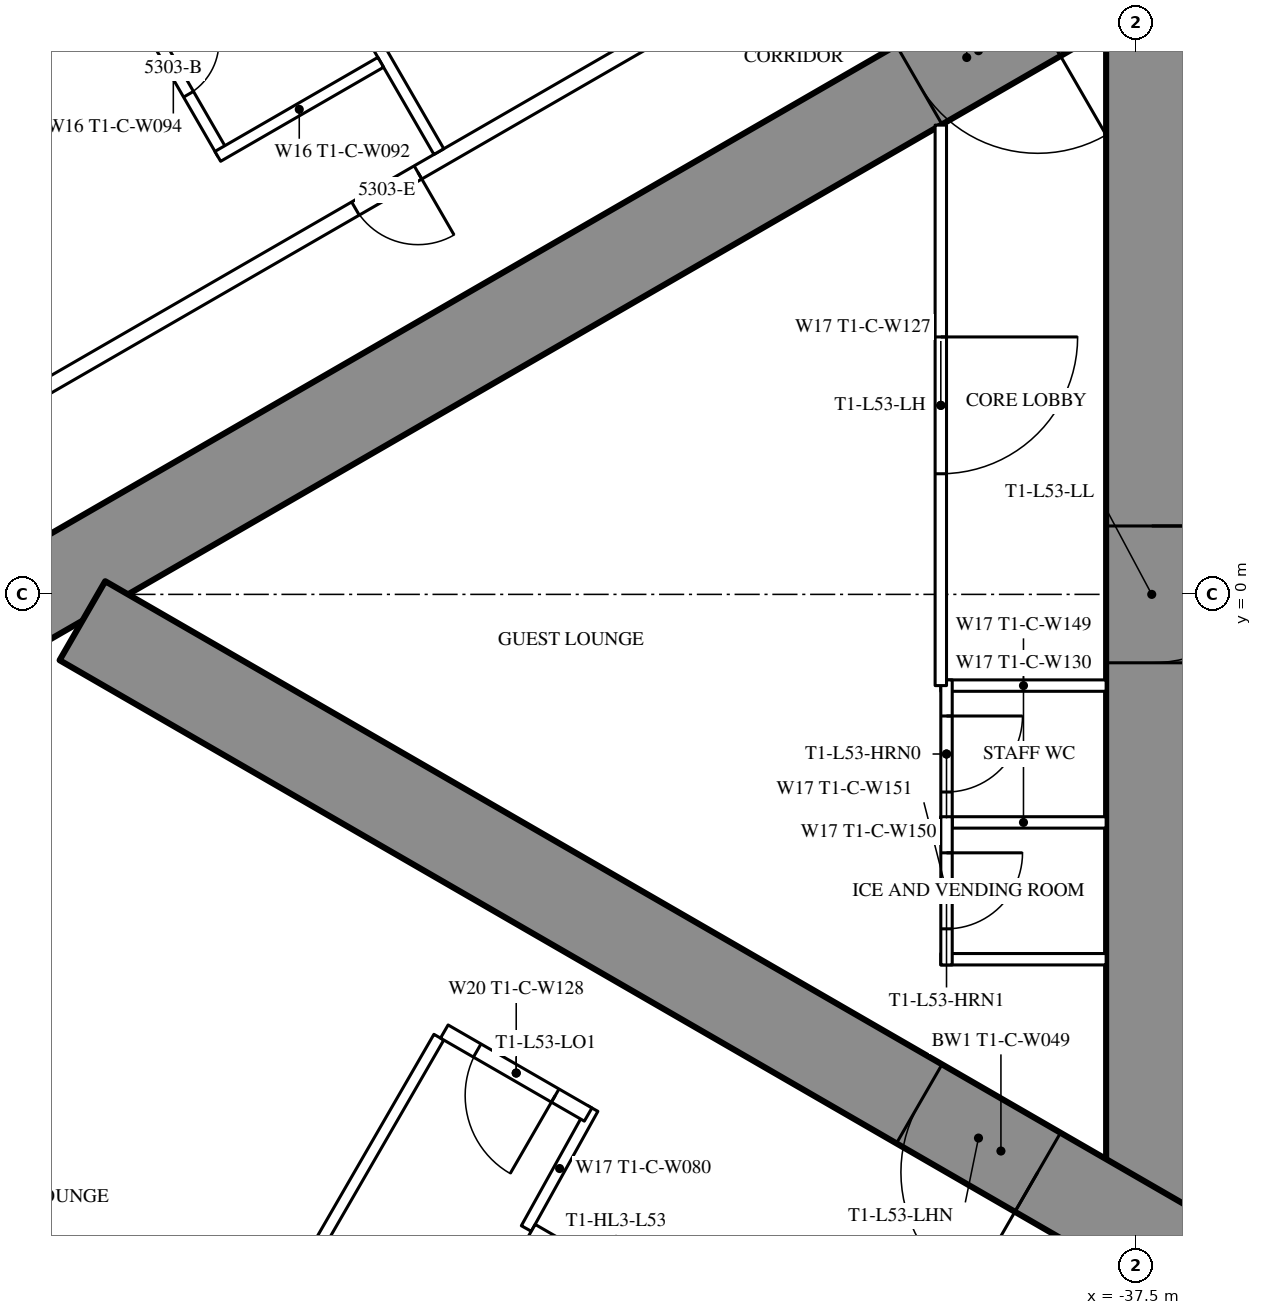
"""IFC4 building model, lengths in metres.
Left out: names, types, materials, properties, quantities, classifications, styles, units other than length and angle.
Written with IfcOpenShell. Run it as: python <this file> out.ifc"""

import sys

from ifc_helpers import new_model, si_unit, direction, frame, frame_2d, origin, place, context, subcontext, project, spatial, rectangle, extrude, element, fill, save


model = new_model("IFC4")
c1 = context("Model", 3, precision=1e-05, world=origin(), true_north=direction((0.0, 1.0)))
c2 = subcontext(c1, "Body", "Model", "MODEL_VIEW")
j1 = project(units=[si_unit("LENGTHUNIT", "METRE"), si_unit("PLANEANGLEUNIT", "RADIAN")], contexts=[c1])
p1 = place(None, origin())
s1 = spatial("IfcSite", under=j1, at=p1, CompositionType="ELEMENT")
p2 = place(p1, origin())
s2 = spatial("IfcBuilding", under=s1, at=p2, CompositionType="ELEMENT")
p3 = place(p2, frame((0.0, 0.0, 198.3)))
s3 = spatial("IfcBuildingStorey", under=s2, at=p3, CompositionType="ELEMENT", Elevation=198.3)
p4 = place(p3, frame((-37.3, 8.6, 0.0), z_axis=(0.0, 0.0, 1.0), x_axis=(0.0, -1.0, 0.0)))
e1 = element("IfcWall", 1, at=p4, inside=s3, PredefinedType="SHEAR", context=c2, shape_type="SweptSolid", body=[
    extrude(rectangle(XDim=17.2, YDim=1.2, at=frame_2d((8.6, 0.0))), origin(), (0.0, 0.0, 1.0), 3.5),
])
p5 = place(p4, frame((7.7, 0.0, 0.0)))
e2 = element("IfcOpeningElement", 2, at=p5, cuts=e1, PredefinedType="OPENING", context=c2, shape_type="SweptSolid", body=[
    extrude(rectangle(XDim=1.8, YDim=2.2, at=frame_2d((0.9, 1.1))), frame((0.0, 0.61, 0.0), z_axis=(0.0, -1.0, 0.0), x_axis=(1.0, 0.0, 0.0)), (0.0, 0.0, 1.0), 1.22),
])
p6 = place(p3, frame((-27.2, 14.3, 0.0), z_axis=(0.0, 0.0, 1.0), x_axis=(-0.866026593062, -0.499997940104, 0.0)))
e3 = element("IfcWall", 3, at=p6, inside=s3, PredefinedType="SHEAR", context=c2, shape_type="SweptSolid", body=[
    extrude(rectangle(XDim=28.946, YDim=1.2, at=frame_2d((14.473, 0.0))), origin(), (0.0, 0.0, 1.0), 3.5),
])
p7 = place(p6, frame((4.6, 0.0, 0.0)))
e4 = element("IfcOpeningElement", 4, at=p7, cuts=e3, PredefinedType="OPENING", context=c2, shape_type="SweptSolid", body=[
    extrude(rectangle(XDim=1.0, YDim=2.2, at=frame_2d((0.5, 1.1))), frame((0.0, 0.61, 0.0), z_axis=(0.0, -1.0, 0.0), x_axis=(1.0, 0.0, 0.0)), (0.0, 0.0, 1.0), 1.22),
])
p8 = place(p6, frame((13.395, 0.0, 0.0)))
e5 = element("IfcOpeningElement", 5, at=p8, cuts=e3, PredefinedType="OPENING", context=c2, shape_type="SweptSolid", body=[
    extrude(rectangle(XDim=1.8, YDim=2.2, at=frame_2d((0.9, 1.1))), frame((0.0, 0.61, 0.0), z_axis=(0.0, -1.0, 0.0), x_axis=(1.0, 0.0, 0.0)), (0.0, 0.0, 1.0), 1.22),
])
p9 = place(p3, frame((-27.2, -14.3, 0.0), z_axis=(0.0, 0.0, 1.0), x_axis=(-0.866024021859, 0.500002393557, 0.0)))
e6 = element("IfcWall", 6, at=p9, inside=s3, PredefinedType="SHEAR", context=c2, shape_type="SweptSolid", body=[
    extrude(rectangle(XDim=27.907, YDim=1.2, at=frame_2d((13.954, 0.0))), origin(), (0.0, 0.0, 1.0), 3.5),
])
p10 = place(p9, frame((4.6, 0.0, 0.0)))
e7 = element("IfcOpeningElement", 7, at=p10, cuts=e6, PredefinedType="OPENING", context=c2, shape_type="SweptSolid", body=[
    extrude(rectangle(XDim=1.0, YDim=2.2, at=frame_2d((0.5, 1.1))), frame((0.0, 0.61, 0.0), z_axis=(0.0, -1.0, 0.0), x_axis=(1.0, 0.0, 0.0)), (0.0, 0.0, 1.0), 1.22),
])
p11 = place(p9, frame((13.395, 0.0, 0.0)))
e8 = element("IfcOpeningElement", 8, at=p11, cuts=e6, PredefinedType="OPENING", context=c2, shape_type="SweptSolid", body=[
    extrude(rectangle(XDim=1.8, YDim=2.2, at=frame_2d((0.9, 1.1))), frame((0.0, 0.61, 0.0), z_axis=(0.0, -1.0, 0.0), x_axis=(1.0, 0.0, 0.0)), (0.0, 0.0, 1.0), 1.22),
])
p12 = place(p3, frame((-27.86, 16.575, 0.0), z_axis=(0.0, 0.0, 1.0), x_axis=(-0.866025533911, -0.499999774615, 0.0)))
e9 = element("IfcWall", 9, at=p12, inside=s3, PredefinedType="PARTITIONING", context=c2, shape_type="SweptSolid", body=[
    extrude(rectangle(XDim=33.149, YDim=0.2, at=frame_2d((16.575, 0.0))), origin(), (0.0, 0.0, 1.0), 3.25),
])
p13 = place(p12, frame((3.75, 0.0, 0.0)))
e10 = element("IfcOpeningElement", 10, at=p13, cuts=e9, PredefinedType="OPENING", context=c2, shape_type="SweptSolid", body=[
    extrude(rectangle(XDim=1.0, YDim=2.2, at=frame_2d((0.5, 1.1))), frame((0.0, 0.11, 0.0), z_axis=(0.0, -1.0, 0.0), x_axis=(1.0, 0.0, 0.0)), (0.0, 0.0, 1.0), 0.22),
])
p14 = place(p12, frame((16.402, 0.0, 0.0)))
e11 = element("IfcOpeningElement", 11, at=p14, cuts=e9, PredefinedType="OPENING", context=c2, shape_type="SweptSolid", body=[
    extrude(rectangle(XDim=0.95, YDim=2.2, at=frame_2d((0.475, 1.1))), frame((0.0, 0.11, 0.0), z_axis=(0.0, -1.0, 0.0), x_axis=(1.0, 0.0, 0.0)), (0.0, 0.0, 1.0), 0.22),
])
p15 = place(p12, frame((22.047, 0.0, 0.0)))
e12 = element("IfcOpeningElement", 12, at=p15, cuts=e9, PredefinedType="OPENING", context=c2, shape_type="SweptSolid", body=[
    extrude(rectangle(XDim=0.95, YDim=2.2, at=frame_2d((0.475, 1.1))), frame((0.0, 0.11, 0.0), z_axis=(0.0, -1.0, 0.0), x_axis=(1.0, 0.0, 0.0)), (0.0, 0.0, 1.0), 0.22),
])
p16 = place(p12, frame((30.396, 0.0, 0.0)))
e13 = element("IfcOpeningElement", 13, at=p16, cuts=e9, PredefinedType="OPENING", context=c2, shape_type="SweptSolid", body=[
    extrude(rectangle(XDim=1.8, YDim=2.2, at=frame_2d((0.9, 1.1))), frame((0.0, 0.11, 0.0), z_axis=(0.0, -1.0, 0.0), x_axis=(1.0, 0.0, 0.0)), (0.0, 0.0, 1.0), 0.22),
])
for number, where, z_axis, x_axis in (
    (14, (-46.679, 5.825, 0.0), (0.0, 0.0, 1.0), (-0.5, 0.866, 0.0)),
    (15, (-46.679, -5.825, 0.0), (0.0, 0.0, 1.0), (-0.5, -0.866, 0.0)),
):
    element("IfcWall", number, at=place(p3, frame(where, z_axis=z_axis, x_axis=x_axis)), inside=s3, PredefinedType="PARTITIONING", context=c2, shape_type="SweptSolid", body=[
        extrude(rectangle(XDim=6.911, YDim=0.15, at=frame_2d((3.456, 0.0))), origin(), (0.0, 0.0, 1.0), 2.3),
    ])
p17 = place(p3, frame((-44.652, -6.764, 0.0), z_axis=(0.0, 0.0, 1.0), x_axis=(-0.485424724123, -0.874278466629, 0.0)))
e16 = element("IfcWall", 16, at=p17, inside=s3, PredefinedType="PARTITIONING", context=c2, shape_type="SweptSolid", body=[
    extrude(rectangle(XDim=1.805, YDim=0.15, at=frame_2d((0.903, 0.0))), origin(), (0.0, 0.0, 1.0), 3.25),
])
p18 = place(p3, frame((-44.715, -6.844, 0.0), z_axis=(0.0, 0.0, 1.0), x_axis=(-0.865999496279, 0.500044870432, 0.0)))
e17 = element("IfcWall", 17, at=p18, inside=s3, PredefinedType="PARTITIONING", context=c2, shape_type="SweptSolid", body=[
    extrude(rectangle(XDim=2.185, YDim=0.2, at=frame_2d((1.092, 0.0))), origin(), (0.0, 0.0, 1.0), 3.25),
])
p19 = place(p18, frame((0.5, 0.0, 0.0)))
e18 = element("IfcOpeningElement", 18, at=p19, cuts=e17, PredefinedType="OPENING", context=c2, shape_type="SweptSolid", body=[
    extrude(rectangle(XDim=1.185, YDim=2.2, at=frame_2d((0.593, 1.1))), frame((0.0, 0.11, 0.0), z_axis=(0.0, -1.0, 0.0), x_axis=(1.0, 0.0, 0.0)), (0.0, 0.0, 1.0), 0.22),
])
p20 = place(p3, frame((-49.522, 5.8, 0.0), z_axis=(0.0, 0.0, 1.0), x_axis=(-0.500006934395, 0.866021400173, 0.0)))
e19 = element("IfcWall", 19, at=p20, inside=s3, PredefinedType="PARTITIONING", context=c2, shape_type="SweptSolid", body=[
    extrude(rectangle(XDim=2.6, YDim=0.15, at=frame_2d((1.3, 0.0))), origin(), (0.0, 0.0, 1.0), 3.25),
])
p21 = place(p20, frame((0.9, 0.0, 0.0)))
e20 = element("IfcOpeningElement", 20, at=p21, cuts=e19, PredefinedType="OPENING", context=c2, shape_type="SweptSolid", body=[
    extrude(rectangle(XDim=0.8, YDim=2.2, at=frame_2d((0.4, 1.1))), frame((0.0, 0.085, 0.0), z_axis=(0.0, -1.0, 0.0), x_axis=(1.0, 0.0, 0.0)), (0.0, 0.0, 1.0), 0.17),
])
p22 = place(p3, frame((-47.444, 7.0, 0.0), z_axis=(0.0, 0.0, 1.0), x_axis=(-0.866006523861, -0.500032699561, 0.0)))
e21 = element("IfcWall", 21, at=p22, inside=s3, PredefinedType="PARTITIONING", context=c2, shape_type="SweptSolid", body=[
    extrude(rectangle(XDim=2.475, YDim=0.15, at=frame_2d((1.237, 0.0))), origin(), (0.0, 0.0, 1.0), 3.25),
])
for number, where, z_axis, x_axis in (
    (22, (-37.9, -1.2, 0.0), (0.0, 0.0, 1.0), (-1.0, 0.0, 0.0)),
    (23, (-37.9, -3.0, 0.0), (0.0, 0.0, 1.0), (-1.0, 0.0, 0.0)),
    (24, (-37.9, -4.8, 0.0), (0.0, 0.0, 1.0), (-1.0, 0.0, 0.0)),
):
    element("IfcWall", number, at=place(p3, frame(where, z_axis=z_axis, x_axis=x_axis)), inside=s3, PredefinedType="PARTITIONING", context=c2, shape_type="SweptSolid", body=[
        extrude(rectangle(XDim=2.175, YDim=0.15, at=frame_2d((1.087, 0.0))), origin(), (0.0, 0.0, 1.0), 3.25),
    ])
p23 = place(p3, frame((-40.0, -1.125, 0.0), z_axis=(0.0, 0.0, 1.0), x_axis=(0.0, -1.0, 0.0)))
e25 = element("IfcWall", 25, at=p23, inside=s3, PredefinedType="PARTITIONING", context=c2, shape_type="SweptSolid", body=[
    extrude(rectangle(XDim=1.95, YDim=0.15, at=frame_2d((0.975, 0.0))), origin(), (0.0, 0.0, 1.0), 3.25),
])
p24 = place(p23, frame((0.475, 0.0, 0.0)))
e26 = element("IfcOpeningElement", 26, at=p24, cuts=e25, PredefinedType="OPENING", context=c2, shape_type="SweptSolid", body=[
    extrude(rectangle(XDim=1.0, YDim=2.2, at=frame_2d((0.5, 1.1))), frame((0.0, 0.085, 0.0), z_axis=(0.0, -1.0, 0.0), x_axis=(1.0, 0.0, 0.0)), (0.0, 0.0, 1.0), 0.17),
])
p25 = place(p3, frame((-40.0, -2.925, 0.0), z_axis=(0.0, 0.0, 1.0), x_axis=(0.0, -1.0, 0.0)))
e27 = element("IfcWall", 27, at=p25, inside=s3, PredefinedType="PARTITIONING", context=c2, shape_type="SweptSolid", body=[
    extrude(rectangle(XDim=1.95, YDim=0.15, at=frame_2d((0.975, 0.0))), origin(), (0.0, 0.0, 1.0), 3.25),
])
p26 = place(p25, frame((0.475, 0.0, 0.0)))
e28 = element("IfcOpeningElement", 28, at=p26, cuts=e27, PredefinedType="OPENING", context=c2, shape_type="SweptSolid", body=[
    extrude(rectangle(XDim=1.0, YDim=2.2, at=frame_2d((0.5, 1.1))), frame((0.0, 0.085, 0.0), z_axis=(0.0, -1.0, 0.0), x_axis=(1.0, 0.0, 0.0)), (0.0, 0.0, 1.0), 0.17),
])
p27 = place(p3, frame((-40.075, 6.174, 0.0), z_axis=(0.0, 0.0, 1.0), x_axis=(0.0, -1.0, 0.0)))
e29 = element("IfcWall", 29, at=p27, inside=s3, PredefinedType="PARTITIONING", context=c2, shape_type="SweptSolid", body=[
    extrude(rectangle(XDim=7.374, YDim=0.15, at=frame_2d((3.687, 0.0))), origin(), (0.0, 0.0, 1.0), 3.25),
])
p28 = place(p27, frame((2.787, 0.0, 0.0)))
e30 = element("IfcOpeningElement", 30, at=p28, cuts=e29, PredefinedType="OPENING", context=c2, shape_type="SweptSolid", body=[
    extrude(rectangle(XDim=1.8, YDim=2.2, at=frame_2d((0.9, 1.1))), frame((0.0, 0.085, 0.0), z_axis=(0.0, -1.0, 0.0), x_axis=(1.0, 0.0, 0.0)), (0.0, 0.0, 1.0), 0.17),
])
p29 = place(p3, frame((-39.758, -11.697, 0.0), z_axis=(0.0, 0.0, 1.0), x_axis=(-0.866024194504, 0.500002094529, 0.0)))
e31 = element("IfcWall", 31, at=p29, inside=s3, PredefinedType="PARTITIONING", context=c2, shape_type="SweptSolid", body=[
    extrude(rectangle(XDim=6.6, YDim=0.25, at=frame_2d((3.3, 0.0))), origin(), (0.0, 0.0, 1.0), 3.25),
])
p30 = place(p29, frame((0.75, 0.0, 0.0)))
e32 = element("IfcOpeningElement", 32, at=p30, cuts=e31, PredefinedType="OPENING", context=c2, shape_type="SweptSolid", body=[
    extrude(rectangle(XDim=1.1, YDim=2.2, at=frame_2d((0.55, 1.1))), frame((0.0, 0.135, 0.0), z_axis=(0.0, -1.0, 0.0), x_axis=(1.0, 0.0, 0.0)), (0.0, 0.0, 1.0), 0.27),
])
p31 = place(p29, frame((2.75, 0.0, 0.0)))
e33 = element("IfcOpeningElement", 33, at=p31, cuts=e31, PredefinedType="OPENING", context=c2, shape_type="SweptSolid", body=[
    extrude(rectangle(XDim=1.1, YDim=2.2, at=frame_2d((0.55, 1.1))), frame((0.0, 0.135, 0.0), z_axis=(0.0, -1.0, 0.0), x_axis=(1.0, 0.0, 0.0)), (0.0, 0.0, 1.0), 0.27),
])
p32 = place(p29, frame((4.75, 0.0, 0.0)))
e34 = element("IfcOpeningElement", 34, at=p32, cuts=e31, PredefinedType="OPENING", context=c2, shape_type="SweptSolid", body=[
    extrude(rectangle(XDim=1.1, YDim=2.2, at=frame_2d((0.55, 1.1))), frame((0.0, 0.135, 0.0), z_axis=(0.0, -1.0, 0.0), x_axis=(1.0, 0.0, 0.0)), (0.0, 0.0, 1.0), 0.27),
])
p33 = place(p21, origin())
e35 = element("IfcDoor", 35, at=p33, inside=s3, OperationType="SINGLE_SWING_RIGHT", PredefinedType="DOOR", context=c2, shape_type="SweptSolid", body=[
    extrude(rectangle(XDim=0.8, YDim=2.2, at=frame_2d((0.4, 1.1))), frame((0.0, 0.025, 0.0), z_axis=(0.0, -1.0, 0.0), x_axis=(1.0, 0.0, 0.0)), (0.0, 0.0, 1.0), 0.05),
])
fill(e20, e35)
p34 = place(p15, origin())
e36 = element("IfcDoor", 36, at=p34, inside=s3, OperationType="SINGLE_SWING_LEFT", PredefinedType="DOOR", context=c2, shape_type="SweptSolid", body=[
    extrude(rectangle(XDim=0.95, YDim=2.2, at=frame_2d((0.475, 1.1))), frame((0.0, 0.025, 0.0), z_axis=(0.0, -1.0, 0.0), x_axis=(1.0, 0.0, 0.0)), (0.0, 0.0, 1.0), 0.05),
])
fill(e12, e36)
p35 = place(p19, origin())
e37 = element("IfcDoor", 37, at=p35, inside=s3, OperationType="SINGLE_SWING_LEFT", PredefinedType="DOOR", context=c2, shape_type="SweptSolid", body=[
    extrude(rectangle(XDim=1.185, YDim=2.2, at=frame_2d((0.593, 1.1))), frame((0.0, 0.025, 0.0), z_axis=(0.0, -1.0, 0.0), x_axis=(1.0, 0.0, 0.0)), (0.0, 0.0, 1.0), 0.05),
])
fill(e18, e37)
p36 = place(p24, origin())
e38 = element("IfcDoor", 38, at=p36, inside=s3, OperationType="SINGLE_SWING_LEFT", PredefinedType="DOOR", context=c2, shape_type="SweptSolid", body=[
    extrude(rectangle(XDim=1.0, YDim=2.2, at=frame_2d((0.5, 1.1))), frame((0.0, 0.025, 0.0), z_axis=(0.0, -1.0, 0.0), x_axis=(1.0, 0.0, 0.0)), (0.0, 0.0, 1.0), 0.05),
])
fill(e26, e38)
p37 = place(p26, origin())
e39 = element("IfcDoor", 39, at=p37, inside=s3, OperationType="SINGLE_SWING_LEFT", PredefinedType="DOOR", context=c2, shape_type="SweptSolid", body=[
    extrude(rectangle(XDim=1.0, YDim=2.2, at=frame_2d((0.5, 1.1))), frame((0.0, 0.025, 0.0), z_axis=(0.0, -1.0, 0.0), x_axis=(1.0, 0.0, 0.0)), (0.0, 0.0, 1.0), 0.05),
])
fill(e28, e39)
p38 = place(p28, origin())
e40 = element("IfcDoor", 40, at=p38, inside=s3, OperationType="DOUBLE_DOOR_SINGLE_SWING", PredefinedType="DOOR", context=c2, shape_type="SweptSolid", body=[
    extrude(rectangle(XDim=1.8, YDim=2.2, at=frame_2d((0.9, 1.1))), frame((0.0, 0.025, 0.0), z_axis=(0.0, -1.0, 0.0), x_axis=(1.0, 0.0, 0.0)), (0.0, 0.0, 1.0), 0.05),
])
fill(e30, e40)
p39 = place(p8, origin())
e41 = element("IfcDoor", 41, at=p39, inside=s3, OperationType="DOUBLE_DOOR_SINGLE_SWING", PredefinedType="DOOR", context=c2, shape_type="SweptSolid", body=[
    extrude(rectangle(XDim=1.8, YDim=2.2, at=frame_2d((0.9, 1.1))), frame((0.0, 0.025, 0.0), z_axis=(0.0, -1.0, 0.0), x_axis=(1.0, 0.0, 0.0)), (0.0, 0.0, 1.0), 0.05),
])
fill(e5, e41)
p40 = place(p11, origin())
e42 = element("IfcDoor", 42, at=p40, inside=s3, OperationType="DOUBLE_DOOR_SINGLE_SWING", PredefinedType="DOOR", context=c2, shape_type="SweptSolid", body=[
    extrude(rectangle(XDim=1.8, YDim=2.2, at=frame_2d((0.9, 1.1))), frame((0.0, 0.025, 0.0), z_axis=(0.0, -1.0, 0.0), x_axis=(1.0, 0.0, 0.0)), (0.0, 0.0, 1.0), 0.05),
])
fill(e8, e42)
p41 = place(p5, origin())
e43 = element("IfcDoor", 43, at=p41, inside=s3, OperationType="DOUBLE_DOOR_SINGLE_SWING", PredefinedType="DOOR", context=c2, shape_type="SweptSolid", body=[
    extrude(rectangle(XDim=1.8, YDim=2.2, at=frame_2d((0.9, 1.1))), frame((0.0, 0.025, 0.0), z_axis=(0.0, -1.0, 0.0), x_axis=(1.0, 0.0, 0.0)), (0.0, 0.0, 1.0), 0.05),
])
fill(e2, e43)
save(model, sys.argv[1])
